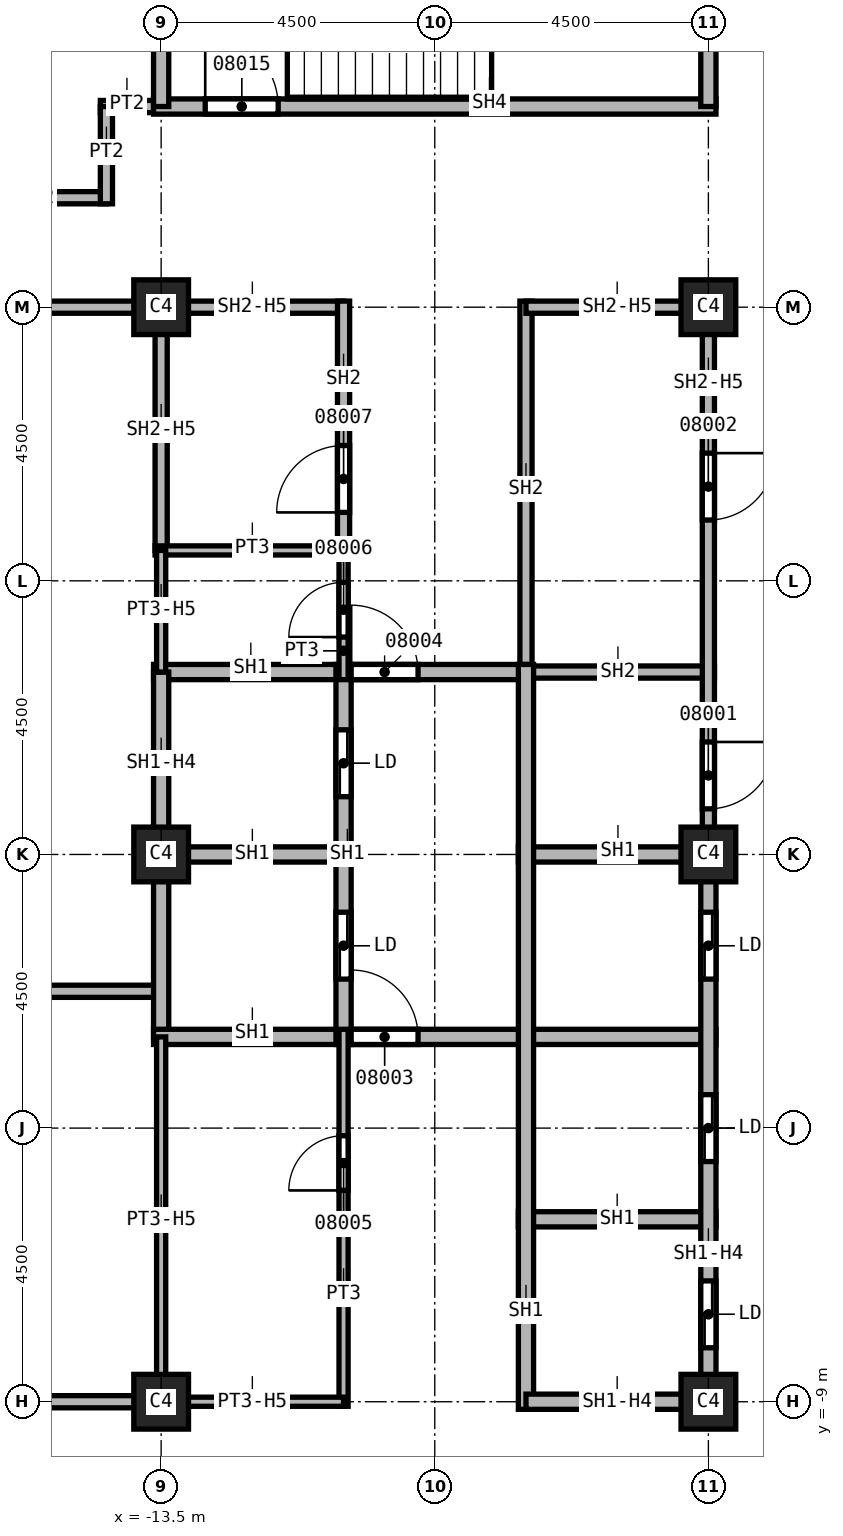
"""IFC4 building model, lengths in metres.
Left out: names, types, materials, properties, quantities, classifications, styles, units other than length and angle.
Written with IfcOpenShell. Run it as: python <this file> out.ifc"""

import sys

from ifc_helpers import new_model, si_unit, direction, frame, frame_2d, origin, origin_2d, place, context, subcontext, project, spatial, rectangle, extrude, element, fill, save


model = new_model("IFC4")
c1 = context("Model", 3, precision=1e-05, world=origin(), true_north=direction((0.0, 1.0)))
c2 = subcontext(c1, "Body", "Model", "MODEL_VIEW")
j1 = project(units=[si_unit("LENGTHUNIT", "METRE"), si_unit("PLANEANGLEUNIT", "RADIAN")], contexts=[c1])
p1 = place(None, origin())
s1 = spatial("IfcSite", under=j1, at=p1, CompositionType="ELEMENT")
p2 = place(p1, origin())
s2 = spatial("IfcBuilding", under=s1, at=p2, CompositionType="ELEMENT")
p3 = place(p2, frame((0.0, 0.0, 150.0)))
s3 = spatial("IfcBuildingStorey", under=s2, at=p3, CompositionType="ELEMENT", Elevation=150.0)
for number, where, z_axis, x_axis in (
    (1, (-4.5, 0.0, 0.0), (0.0, 0.0, 1.0), (1.0, 0.0, 0.0)),
    (2, (-4.5, 9.0, 0.0), (0.0, 0.0, 1.0), (1.0, 0.0, 0.0)),
    (3, (-4.5, -9.0, 0.0), (0.0, 0.0, 1.0), (1.0, 0.0, 0.0)),
    (4, (-13.5, 0.0, 0.0), (0.0, 0.0, 1.0), (1.0, 0.0, 0.0)),
    (5, (-13.5, 9.0, 0.0), (0.0, 0.0, 1.0), (1.0, 0.0, 0.0)),
    (6, (-13.5, -9.0, 0.0), (0.0, 0.0, 1.0), (1.0, 0.0, 0.0)),
):
    element("IfcColumn", number, at=place(p3, frame(where, z_axis=z_axis, x_axis=x_axis)), inside=s3, PredefinedType="COLUMN", context=c2, shape_type="SweptSolid", body=[
        extrude(rectangle(XDim=0.9, YDim=0.9, at=origin_2d()), origin(), (0.0, 0.0, 1.0), 3.7),
    ])
for number, where, z_axis, x_axis in (
    (7, (-18.0, -9.0, 0.0), (0.0, 0.0, 1.0), (1.0, 0.0, 0.0)),
    (8, (-18.0, -2.25, 0.0), (0.0, 0.0, 1.0), (1.0, 0.0, 0.0)),
):
    element("IfcWall", number, at=place(p3, frame(where, z_axis=z_axis, x_axis=x_axis)), inside=s3, PredefinedType="PARTITIONING", context=c2, shape_type="SweptSolid", body=[
        extrude(rectangle(XDim=4.5, YDim=0.2, at=frame_2d((2.25, 0.0))), origin(), (0.0, 0.0, 1.0), 3.7),
    ])
p4 = place(p3, frame((-18.0, 10.8, 0.0), z_axis=(0.0, 0.0, 1.0), x_axis=(1.0, 0.0, 0.0)))
e9 = element("IfcWall", 9, at=p4, inside=s3, PredefinedType="PARTITIONING", context=c2, shape_type="SweptSolid", body=[
    extrude(rectangle(XDim=3.6, YDim=0.2, at=frame_2d((1.8, 0.0))), origin(), (0.0, 0.0, 1.0), 3.7),
])
p5 = place(p4, frame((0.4, 0.0, 0.0)))
e10 = element("IfcOpeningElement", 10, at=p5, cuts=e9, PredefinedType="OPENING", context=c2, shape_type="SweptSolid", body=[
    extrude(rectangle(XDim=1.0, YDim=2.1, at=frame_2d((0.5, 1.05))), frame((0.0, 0.1, 0.0), z_axis=(0.0, -1.0, 0.0), x_axis=(1.0, 0.0, 0.0)), (0.0, 0.0, 1.0), 0.2),
])
p6 = place(p3, frame((-14.5, 12.3, 0.0), z_axis=(0.0, 0.0, 1.0), x_axis=(1.0, 0.0, 0.0)))
e11 = element("IfcWall", 11, at=p6, inside=s3, PredefinedType="PARTITIONING", context=c2, shape_type="SweptSolid", body=[
    extrude(rectangle(XDim=1.125, YDim=0.2, at=frame_2d((0.562, 0.0))), origin(), (0.0, 0.0, 1.0), 3.7),
])
p7 = place(p3, frame((-13.5, 9.0, 0.0), z_axis=(0.0, 0.0, 1.0), x_axis=(-1.0, 0.0, 0.0)))
e12 = element("IfcWall", 12, at=p7, inside=s3, PredefinedType="PARTITIONING", context=c2, shape_type="SweptSolid", body=[
    extrude(rectangle(XDim=4.5, YDim=0.2, at=frame_2d((2.25, 0.0))), origin(), (0.0, 0.0, 1.0), 3.7),
])
p8 = place(p3, frame((-14.4, 10.7, 0.0), z_axis=(0.0, 0.0, 1.0), x_axis=(0.0, 1.0, 0.0)))
e13 = element("IfcWall", 13, at=p8, inside=s3, PredefinedType="PARTITIONING", context=c2, shape_type="SweptSolid", body=[
    extrude(rectangle(XDim=1.6, YDim=0.2, at=frame_2d((0.8, 0.0))), origin(), (0.0, 0.0, 1.0), 3.7),
])
p9 = place(p3, frame((-13.6, 9.0, 0.0), z_axis=(0.0, 0.0, 1.0), x_axis=(1.0, 0.0, 0.0)))
e14 = element("IfcWall", 14, at=p9, inside=s3, PredefinedType="SOLIDWALL", context=c2, shape_type="SweptSolid", body=[
    extrude(rectangle(XDim=3.1, YDim=0.2, at=frame_2d((1.55, 0.0))), origin(), (0.0, 0.0, 1.0), 2.938),
])
p10 = place(p3, frame((-13.5, 5.0, 0.0), z_axis=(0.0, 0.0, 1.0), x_axis=(0.0, 1.0, 0.0)))
e15 = element("IfcWall", 15, at=p10, inside=s3, PredefinedType="SOLIDWALL", context=c2, shape_type="SweptSolid", body=[
    extrude(rectangle(XDim=4.1, YDim=0.2, at=frame_2d((2.05, 0.0))), origin(), (0.0, 0.0, 1.0), 2.938),
])
p11 = place(p3, frame((-10.5, 4.925, 0.0), z_axis=(0.0, 0.0, 1.0), x_axis=(0.0, 1.0, 0.0)))
e16 = element("IfcWall", 16, at=p11, inside=s3, PredefinedType="SOLIDWALL", context=c2, shape_type="SweptSolid", body=[
    extrude(rectangle(XDim=4.175, YDim=0.2, at=frame_2d((2.087, 0.0))), origin(), (0.0, 0.0, 1.0), 3.7),
])
p12 = place(p11, frame((0.7, 0.0, 0.0)))
e17 = element("IfcOpeningElement", 17, at=p12, cuts=e16, PredefinedType="OPENING", context=c2, shape_type="SweptSolid", body=[
    extrude(rectangle(XDim=1.1, YDim=2.1, at=frame_2d((0.55, 1.05))), frame((0.0, 0.1, 0.0), z_axis=(0.0, -1.0, 0.0), x_axis=(1.0, 0.0, 0.0)), (0.0, 0.0, 1.0), 0.2),
])
p13 = place(p3, frame((-7.625, 3.0, 0.0), z_axis=(0.0, 0.0, 1.0), x_axis=(1.0, 0.0, 0.0)))
e18 = element("IfcWall", 18, at=p13, inside=s3, PredefinedType="SOLIDWALL", context=c2, shape_type="SweptSolid", body=[
    extrude(rectangle(XDim=3.225, YDim=0.2, at=frame_2d((1.613, 0.0))), origin(), (0.0, 0.0, 1.0), 3.7),
])
p14 = place(p3, frame((-7.5, 2.875, 0.0), z_axis=(0.0, 0.0, 1.0), x_axis=(0.0, 1.0, 0.0)))
e19 = element("IfcWall", 19, at=p14, inside=s3, PredefinedType="SOLIDWALL", context=c2, shape_type="SweptSolid", body=[
    extrude(rectangle(XDim=6.225, YDim=0.2, at=frame_2d((3.113, 0.0))), origin(), (0.0, 0.0, 1.0), 3.7),
])
p15 = place(p3, frame((-7.5, 9.0, 0.0), z_axis=(0.0, 0.0, 1.0), x_axis=(1.0, 0.0, 0.0)))
e20 = element("IfcWall", 20, at=p15, inside=s3, PredefinedType="SOLIDWALL", context=c2, shape_type="SweptSolid", body=[
    extrude(rectangle(XDim=3.0, YDim=0.2, at=frame_2d((1.5, 0.0))), origin(), (0.0, 0.0, 1.0), 2.938),
])
p16 = place(p3, frame((-4.5, 9.1, 0.0), z_axis=(0.0, 0.0, 1.0), x_axis=(0.0, -1.0, 0.0)))
e21 = element("IfcWall", 21, at=p16, inside=s3, PredefinedType="SOLIDWALL", context=c2, shape_type="SweptSolid", body=[
    extrude(rectangle(XDim=9.1, YDim=0.2, at=frame_2d((4.55, 0.0))), origin(), (0.0, 0.0, 1.0), 2.938),
])
p17 = place(p16, frame((7.25, 0.0, 0.0)))
e22 = element("IfcOpeningElement", 22, at=p17, cuts=e21, PredefinedType="OPENING", context=c2, shape_type="SweptSolid", body=[
    extrude(rectangle(XDim=1.1, YDim=2.1, at=frame_2d((0.55, 1.05))), frame((0.0, 0.1, 0.0), z_axis=(0.0, -1.0, 0.0), x_axis=(1.0, 0.0, 0.0)), (0.0, 0.0, 1.0), 0.2),
])
p18 = place(p16, frame((2.5, 0.0, 0.0)))
e23 = element("IfcOpeningElement", 23, at=p18, cuts=e21, PredefinedType="OPENING", context=c2, shape_type="SweptSolid", body=[
    extrude(rectangle(XDim=1.1, YDim=2.1, at=frame_2d((0.55, 1.05))), frame((0.0, 0.1, 0.0), z_axis=(0.0, -1.0, 0.0), x_axis=(1.0, 0.0, 0.0)), (0.0, 0.0, 1.0), 0.2),
])
p19 = place(p3, frame((-13.625, 0.0, 0.0), z_axis=(0.0, 0.0, 1.0), x_axis=(1.0, 0.0, 0.0)))
e24 = element("IfcWall", 24, at=p19, inside=s3, PredefinedType="SOLIDWALL", context=c2, shape_type="SweptSolid", body=[
    extrude(rectangle(XDim=3.125, YDim=0.25, at=frame_2d((1.562, 0.0))), origin(), (0.0, 0.0, 1.0), 3.7),
])
p20 = place(p3, frame((-13.625, 3.0, 0.0), z_axis=(0.0, 0.0, 1.0), x_axis=(1.0, 0.0, 0.0)))
e25 = element("IfcWall", 25, at=p20, inside=s3, PredefinedType="SOLIDWALL", context=c2, shape_type="SweptSolid", body=[
    extrude(rectangle(XDim=6.125, YDim=0.25, at=frame_2d((3.062, 0.0))), origin(), (0.0, 0.0, 1.0), 3.7),
])
p21 = place(p20, frame((3.25, 0.0, 0.0)))
e26 = element("IfcOpeningElement", 26, at=p21, cuts=e25, PredefinedType="OPENING", context=c2, shape_type="SweptSolid", body=[
    extrude(rectangle(XDim=1.1, YDim=2.1, at=frame_2d((0.55, 1.05))), frame((0.0, 0.125, 0.0), z_axis=(0.0, -1.0, 0.0), x_axis=(1.0, 0.0, 0.0)), (0.0, 0.0, 1.0), 0.25),
])
p22 = place(p3, frame((-13.5, -3.0, 0.0), z_axis=(0.0, 0.0, 1.0), x_axis=(0.0, 1.0, 0.0)))
e27 = element("IfcWall", 27, at=p22, inside=s3, PredefinedType="SOLIDWALL", context=c2, shape_type="SweptSolid", body=[
    extrude(rectangle(XDim=6.0, YDim=0.25, at=frame_2d((3.0, 0.0))), origin(), (0.0, 0.0, 1.0), 2.938),
])
p23 = place(p3, frame((-13.625, -3.0, 0.0), z_axis=(0.0, 0.0, 1.0), x_axis=(1.0, 0.0, 0.0)))
e28 = element("IfcWall", 28, at=p23, inside=s3, PredefinedType="SOLIDWALL", context=c2, shape_type="SweptSolid", body=[
    extrude(rectangle(XDim=9.25, YDim=0.25, at=frame_2d((4.625, 0.0))), origin(), (0.0, 0.0, 1.0), 3.7),
])
p24 = place(p23, frame((3.25, 0.0, 0.0)))
e29 = element("IfcOpeningElement", 29, at=p24, cuts=e28, PredefinedType="OPENING", context=c2, shape_type="SweptSolid", body=[
    extrude(rectangle(XDim=1.1, YDim=2.1, at=frame_2d((0.55, 1.05))), frame((0.0, 0.125, 0.0), z_axis=(0.0, -1.0, 0.0), x_axis=(1.0, 0.0, 0.0)), (0.0, 0.0, 1.0), 0.25),
])
p25 = place(p3, frame((-10.5, -3.125, 0.0), z_axis=(0.0, 0.0, 1.0), x_axis=(0.0, 1.0, 0.0)))
e30 = element("IfcWall", 30, at=p25, inside=s3, PredefinedType="SOLIDWALL", context=c2, shape_type="SweptSolid", body=[
    extrude(rectangle(XDim=6.25, YDim=0.25, at=frame_2d((3.125, 0.0))), origin(), (0.0, 0.0, 1.0), 3.7),
])
p26 = place(p25, frame((1.075, 0.0, 0.0)))
e31 = element("IfcOpeningElement", 31, at=p26, cuts=e30, PredefinedType="OPENING", context=c2, shape_type="SweptSolid", body=[
    extrude(rectangle(XDim=1.1, YDim=2.1, at=frame_2d((0.55, 1.05))), frame((0.0, 0.125, 0.0), z_axis=(0.0, -1.0, 0.0), x_axis=(1.0, 0.0, 0.0)), (0.0, 0.0, 1.0), 0.25),
])
p27 = place(p25, frame((4.075, 0.0, 0.0)))
e32 = element("IfcOpeningElement", 32, at=p27, cuts=e30, PredefinedType="OPENING", context=c2, shape_type="SweptSolid", body=[
    extrude(rectangle(XDim=1.1, YDim=2.1, at=frame_2d((0.55, 1.05))), frame((0.0, 0.125, 0.0), z_axis=(0.0, -1.0, 0.0), x_axis=(1.0, 0.0, 0.0)), (0.0, 0.0, 1.0), 0.25),
])
for number, where, z_axis, x_axis in (
    (33, (-7.625, -6.0, 0.0), (0.0, 0.0, 1.0), (1.0, 0.0, 0.0)),
    (34, (-7.625, 0.0, 0.0), (0.0, 0.0, 1.0), (1.0, 0.0, 0.0)),
):
    element("IfcWall", number, at=place(p3, frame(where, z_axis=z_axis, x_axis=x_axis)), inside=s3, PredefinedType="SOLIDWALL", context=c2, shape_type="SweptSolid", body=[
        extrude(rectangle(XDim=3.25, YDim=0.25, at=frame_2d((1.625, 0.0))), origin(), (0.0, 0.0, 1.0), 3.7),
    ])
p28 = place(p3, frame((-7.5, -9.125, 0.0), z_axis=(0.0, 0.0, 1.0), x_axis=(0.0, 1.0, 0.0)))
e35 = element("IfcWall", 35, at=p28, inside=s3, PredefinedType="SOLIDWALL", context=c2, shape_type="SweptSolid", body=[
    extrude(rectangle(XDim=12.25, YDim=0.25, at=frame_2d((6.125, 0.0))), origin(), (0.0, 0.0, 1.0), 3.7),
])
p29 = place(p3, frame((-4.5, -9.0, 0.0), z_axis=(0.0, 0.0, 1.0), x_axis=(-1.0, 0.0, 0.0)))
e36 = element("IfcWall", 36, at=p29, inside=s3, PredefinedType="SOLIDWALL", context=c2, shape_type="SweptSolid", body=[
    extrude(rectangle(XDim=3.0, YDim=0.25, at=frame_2d((1.5, 0.0))), origin(), (0.0, 0.0, 1.0), 2.938),
])
p30 = place(p3, frame((-4.5, 0.0, 0.0), z_axis=(0.0, 0.0, 1.0), x_axis=(0.0, -1.0, 0.0)))
e37 = element("IfcWall", 37, at=p30, inside=s3, PredefinedType="SOLIDWALL", context=c2, shape_type="SweptSolid", body=[
    extrude(rectangle(XDim=9.125, YDim=0.25, at=frame_2d((4.562, 0.0))), origin(), (0.0, 0.0, 1.0), 2.938),
])
p31 = place(p30, frame((7.012, 0.0, 0.0)))
e38 = element("IfcOpeningElement", 38, at=p31, cuts=e37, PredefinedType="OPENING", context=c2, shape_type="SweptSolid", body=[
    extrude(rectangle(XDim=1.1, YDim=2.1, at=frame_2d((0.55, 1.05))), frame((0.0, 0.125, 0.0), z_axis=(0.0, -1.0, 0.0), x_axis=(1.0, 0.0, 0.0)), (0.0, 0.0, 1.0), 0.25),
])
p32 = place(p30, frame((3.95, 0.0, 0.0)))
e39 = element("IfcOpeningElement", 39, at=p32, cuts=e37, PredefinedType="OPENING", context=c2, shape_type="SweptSolid", body=[
    extrude(rectangle(XDim=1.1, YDim=2.1, at=frame_2d((0.55, 1.05))), frame((0.0, 0.125, 0.0), z_axis=(0.0, -1.0, 0.0), x_axis=(1.0, 0.0, 0.0)), (0.0, 0.0, 1.0), 0.25),
])
p33 = place(p30, frame((0.95, 0.0, 0.0)))
e40 = element("IfcOpeningElement", 40, at=p33, cuts=e37, PredefinedType="OPENING", context=c2, shape_type="SweptSolid", body=[
    extrude(rectangle(XDim=1.1, YDim=2.1, at=frame_2d((0.55, 1.05))), frame((0.0, 0.125, 0.0), z_axis=(0.0, -1.0, 0.0), x_axis=(1.0, 0.0, 0.0)), (0.0, 0.0, 1.0), 0.25),
])
p34 = place(p3, frame((-13.625, 12.3, 0.0), z_axis=(0.0, 0.0, 1.0), x_axis=(1.0, 0.0, 0.0)))
e41 = element("IfcWall", 41, at=p34, inside=s3, PredefinedType="SOLIDWALL", context=c2, shape_type="SweptSolid", body=[
    extrude(rectangle(XDim=9.25, YDim=0.25, at=frame_2d((4.625, 0.0))), origin(), (0.0, 0.0, 1.0), 3.7),
])
p35 = place(p34, frame((0.85, 0.0, 0.0)))
e42 = element("IfcOpeningElement", 42, at=p35, cuts=e41, PredefinedType="OPENING", context=c2, shape_type="SweptSolid", body=[
    extrude(rectangle(XDim=1.2, YDim=2.1, at=frame_2d((0.6, 1.05))), frame((0.0, 0.125, 0.0), z_axis=(0.0, -1.0, 0.0), x_axis=(1.0, 0.0, 0.0)), (0.0, 0.0, 1.0), 0.25),
])
for number, where, z_axis, x_axis in (
    (43, (-13.5, 12.3, 0.0), (0.0, 0.0, 1.0), (0.0, 1.0, 0.0)),
    (44, (-4.5, 16.8, 0.0), (0.0, 0.0, 1.0), (0.0, -1.0, 0.0)),
):
    element("IfcWall", number, at=place(p3, frame(where, z_axis=z_axis, x_axis=x_axis)), inside=s3, PredefinedType="SOLIDWALL", context=c2, shape_type="SweptSolid", body=[
        extrude(rectangle(XDim=4.5, YDim=0.25, at=frame_2d((2.25, 0.0))), origin(), (0.0, 0.0, 1.0), 3.7),
    ])
p36 = place(p3, frame((-13.6, 5.0, 0.0), z_axis=(0.0, 0.0, 1.0), x_axis=(1.0, 0.0, 0.0)))
e45 = element("IfcWall", 45, at=p36, inside=s3, PredefinedType="PARTITIONING", context=c2, shape_type="SweptSolid", body=[
    extrude(rectangle(XDim=3.1, YDim=0.15, at=frame_2d((1.55, 0.0))), origin(), (0.0, 0.0, 1.0), 3.7),
])
p37 = place(p3, frame((-13.5, -9.1, 0.0), z_axis=(0.0, 0.0, 1.0), x_axis=(0.0, 1.0, 0.0)))
e46 = element("IfcWall", 46, at=p37, inside=s3, PredefinedType="PARTITIONING", context=c2, shape_type="SweptSolid", body=[
    extrude(rectangle(XDim=6.1, YDim=0.15, at=frame_2d((3.05, 0.0))), origin(), (0.0, 0.0, 1.0), 2.938),
])
p38 = place(p3, frame((-13.5, 3.0, 0.0), z_axis=(0.0, 0.0, 1.0), x_axis=(0.0, 1.0, 0.0)))
e47 = element("IfcWall", 47, at=p38, inside=s3, PredefinedType="PARTITIONING", context=c2, shape_type="SweptSolid", body=[
    extrude(rectangle(XDim=2.0, YDim=0.15, at=frame_2d((1.0, 0.0))), origin(), (0.0, 0.0, 1.0), 2.938),
])
p39 = place(p3, frame((-10.5, -9.075, 0.0), z_axis=(0.0, 0.0, 1.0), x_axis=(0.0, 1.0, 0.0)))
e48 = element("IfcWall", 48, at=p39, inside=s3, PredefinedType="PARTITIONING", context=c2, shape_type="SweptSolid", body=[
    extrude(rectangle(XDim=6.2, YDim=0.15, at=frame_2d((3.1, 0.0))), origin(), (0.0, 0.0, 1.0), 3.7),
])
p40 = place(p39, frame((3.55, 0.0, 0.0)))
e49 = element("IfcOpeningElement", 49, at=p40, cuts=e48, PredefinedType="OPENING", context=c2, shape_type="SweptSolid", body=[
    extrude(rectangle(XDim=0.9, YDim=2.1, at=frame_2d((0.45, 1.05))), frame((0.0, 0.075, 0.0), z_axis=(0.0, -1.0, 0.0), x_axis=(1.0, 0.0, 0.0)), (0.0, 0.0, 1.0), 0.15),
])
p41 = place(p3, frame((-10.5, -9.0, 0.0), z_axis=(0.0, 0.0, 1.0), x_axis=(-1.0, 0.0, 0.0)))
e50 = element("IfcWall", 50, at=p41, inside=s3, PredefinedType="PARTITIONING", context=c2, shape_type="SweptSolid", body=[
    extrude(rectangle(XDim=3.075, YDim=0.15, at=frame_2d((1.538, 0.0))), origin(), (0.0, 0.0, 1.0), 2.938),
])
p42 = place(p3, frame((-10.5, 2.875, 0.0), z_axis=(0.0, 0.0, 1.0), x_axis=(0.0, 1.0, 0.0)))
e51 = element("IfcWall", 51, at=p42, inside=s3, PredefinedType="PARTITIONING", context=c2, shape_type="SweptSolid", body=[
    extrude(rectangle(XDim=2.2, YDim=0.15, at=frame_2d((1.1, 0.0))), origin(), (0.0, 0.0, 1.0), 3.7),
])
p43 = place(p42, frame((0.7, 0.0, 0.0)))
e52 = element("IfcOpeningElement", 52, at=p43, cuts=e51, PredefinedType="OPENING", context=c2, shape_type="SweptSolid", body=[
    extrude(rectangle(XDim=0.9, YDim=2.1, at=frame_2d((0.45, 1.05))), frame((0.0, 0.075, 0.0), z_axis=(0.0, -1.0, 0.0), x_axis=(1.0, 0.0, 0.0)), (0.0, 0.0, 1.0), 0.15),
])
p44 = place(p17, origin())
e53 = element("IfcDoor", 53, at=p44, inside=s3, OperationType="SINGLE_SWING_RIGHT", PredefinedType="DOOR", context=c2, shape_type="SweptSolid", body=[
    extrude(rectangle(XDim=1.1, YDim=2.1, at=frame_2d((0.55, 1.05))), frame((0.0, 0.025, 0.0), z_axis=(0.0, -1.0, 0.0), x_axis=(1.0, 0.0, 0.0)), (0.0, 0.0, 1.0), 0.05),
])
fill(e22, e53)
p45 = place(p18, origin())
e54 = element("IfcDoor", 54, at=p45, inside=s3, OperationType="SINGLE_SWING_LEFT", PredefinedType="DOOR", context=c2, shape_type="SweptSolid", body=[
    extrude(rectangle(XDim=1.1, YDim=2.1, at=frame_2d((0.55, 1.05))), frame((0.0, 0.025, 0.0), z_axis=(0.0, -1.0, 0.0), x_axis=(1.0, 0.0, 0.0)), (0.0, 0.0, 1.0), 0.05),
])
fill(e23, e54)
p46 = place(p24, origin())
e55 = element("IfcDoor", 55, at=p46, inside=s3, OperationType="SINGLE_SWING_RIGHT", PredefinedType="DOOR", context=c2, shape_type="SweptSolid", body=[
    extrude(rectangle(XDim=1.1, YDim=2.1, at=frame_2d((0.55, 1.05))), frame((0.0, 0.025, 0.0), z_axis=(0.0, -1.0, 0.0), x_axis=(1.0, 0.0, 0.0)), (0.0, 0.0, 1.0), 0.05),
])
fill(e29, e55)
p47 = place(p21, origin())
e56 = element("IfcDoor", 56, at=p47, inside=s3, OperationType="SINGLE_SWING_LEFT", PredefinedType="DOOR", context=c2, shape_type="SweptSolid", body=[
    extrude(rectangle(XDim=1.1, YDim=2.1, at=frame_2d((0.55, 1.05))), frame((0.0, 0.025, 0.0), z_axis=(0.0, -1.0, 0.0), x_axis=(1.0, 0.0, 0.0)), (0.0, 0.0, 1.0), 0.05),
])
fill(e26, e56)
p48 = place(p40, origin())
e57 = element("IfcDoor", 57, at=p48, inside=s3, OperationType="SINGLE_SWING_RIGHT", PredefinedType="DOOR", context=c2, shape_type="SweptSolid", body=[
    extrude(rectangle(XDim=0.9, YDim=2.1, at=frame_2d((0.45, 1.05))), frame((0.0, 0.025, 0.0), z_axis=(0.0, -1.0, 0.0), x_axis=(1.0, 0.0, 0.0)), (0.0, 0.0, 1.0), 0.05),
])
fill(e49, e57)
p49 = place(p43, origin())
e58 = element("IfcDoor", 58, at=p49, inside=s3, OperationType="SINGLE_SWING_LEFT", PredefinedType="DOOR", context=c2, shape_type="SweptSolid", body=[
    extrude(rectangle(XDim=0.9, YDim=2.1, at=frame_2d((0.45, 1.05))), frame((0.0, 0.025, 0.0), z_axis=(0.0, -1.0, 0.0), x_axis=(1.0, 0.0, 0.0)), (0.0, 0.0, 1.0), 0.05),
])
fill(e52, e58)
p50 = place(p12, origin())
e59 = element("IfcDoor", 59, at=p50, inside=s3, OperationType="SINGLE_SWING_RIGHT", PredefinedType="DOOR", context=c2, shape_type="SweptSolid", body=[
    extrude(rectangle(XDim=1.1, YDim=2.1, at=frame_2d((0.55, 1.05))), frame((0.0, 0.025, 0.0), z_axis=(0.0, -1.0, 0.0), x_axis=(1.0, 0.0, 0.0)), (0.0, 0.0, 1.0), 0.05),
])
fill(e17, e59)
p51 = place(p35, origin())
e60 = element("IfcDoor", 60, at=p51, inside=s3, OperationType="SINGLE_SWING_RIGHT", PredefinedType="DOOR", context=c2, shape_type="SweptSolid", body=[
    extrude(rectangle(XDim=1.2, YDim=2.1, at=frame_2d((0.6, 1.05))), frame((0.0, 0.025, 0.0), z_axis=(0.0, -1.0, 0.0), x_axis=(1.0, 0.0, 0.0)), (0.0, 0.0, 1.0), 0.05),
])
fill(e42, e60)
p52 = place(p31, origin())
e61 = element("IfcDoor", 61, at=p52, inside=s3, OperationType="SLIDING_TO_LEFT", PredefinedType="DOOR", context=c2, shape_type="SweptSolid", body=[
    extrude(rectangle(XDim=1.1, YDim=2.1, at=frame_2d((0.55, 1.05))), frame((0.0, 0.025, 0.0), z_axis=(0.0, -1.0, 0.0), x_axis=(1.0, 0.0, 0.0)), (0.0, 0.0, 1.0), 0.05),
])
fill(e38, e61)
p53 = place(p32, origin())
e62 = element("IfcDoor", 62, at=p53, inside=s3, OperationType="SLIDING_TO_LEFT", PredefinedType="DOOR", context=c2, shape_type="SweptSolid", body=[
    extrude(rectangle(XDim=1.1, YDim=2.1, at=frame_2d((0.55, 1.05))), frame((0.0, 0.025, 0.0), z_axis=(0.0, -1.0, 0.0), x_axis=(1.0, 0.0, 0.0)), (0.0, 0.0, 1.0), 0.05),
])
fill(e39, e62)
p54 = place(p33, origin())
e63 = element("IfcDoor", 63, at=p54, inside=s3, OperationType="SLIDING_TO_LEFT", PredefinedType="DOOR", context=c2, shape_type="SweptSolid", body=[
    extrude(rectangle(XDim=1.1, YDim=2.1, at=frame_2d((0.55, 1.05))), frame((0.0, 0.025, 0.0), z_axis=(0.0, -1.0, 0.0), x_axis=(1.0, 0.0, 0.0)), (0.0, 0.0, 1.0), 0.05),
])
fill(e40, e63)
p55 = place(p26, origin())
e64 = element("IfcDoor", 64, at=p55, inside=s3, OperationType="SLIDING_TO_LEFT", PredefinedType="DOOR", context=c2, shape_type="SweptSolid", body=[
    extrude(rectangle(XDim=1.1, YDim=2.1, at=frame_2d((0.55, 1.05))), frame((0.0, 0.025, 0.0), z_axis=(0.0, -1.0, 0.0), x_axis=(1.0, 0.0, 0.0)), (0.0, 0.0, 1.0), 0.05),
])
fill(e31, e64)
p56 = place(p27, origin())
e65 = element("IfcDoor", 65, at=p56, inside=s3, OperationType="SLIDING_TO_LEFT", PredefinedType="DOOR", context=c2, shape_type="SweptSolid", body=[
    extrude(rectangle(XDim=1.1, YDim=2.1, at=frame_2d((0.55, 1.05))), frame((0.0, 0.025, 0.0), z_axis=(0.0, -1.0, 0.0), x_axis=(1.0, 0.0, 0.0)), (0.0, 0.0, 1.0), 0.05),
])
fill(e32, e65)
save(model, sys.argv[1])
